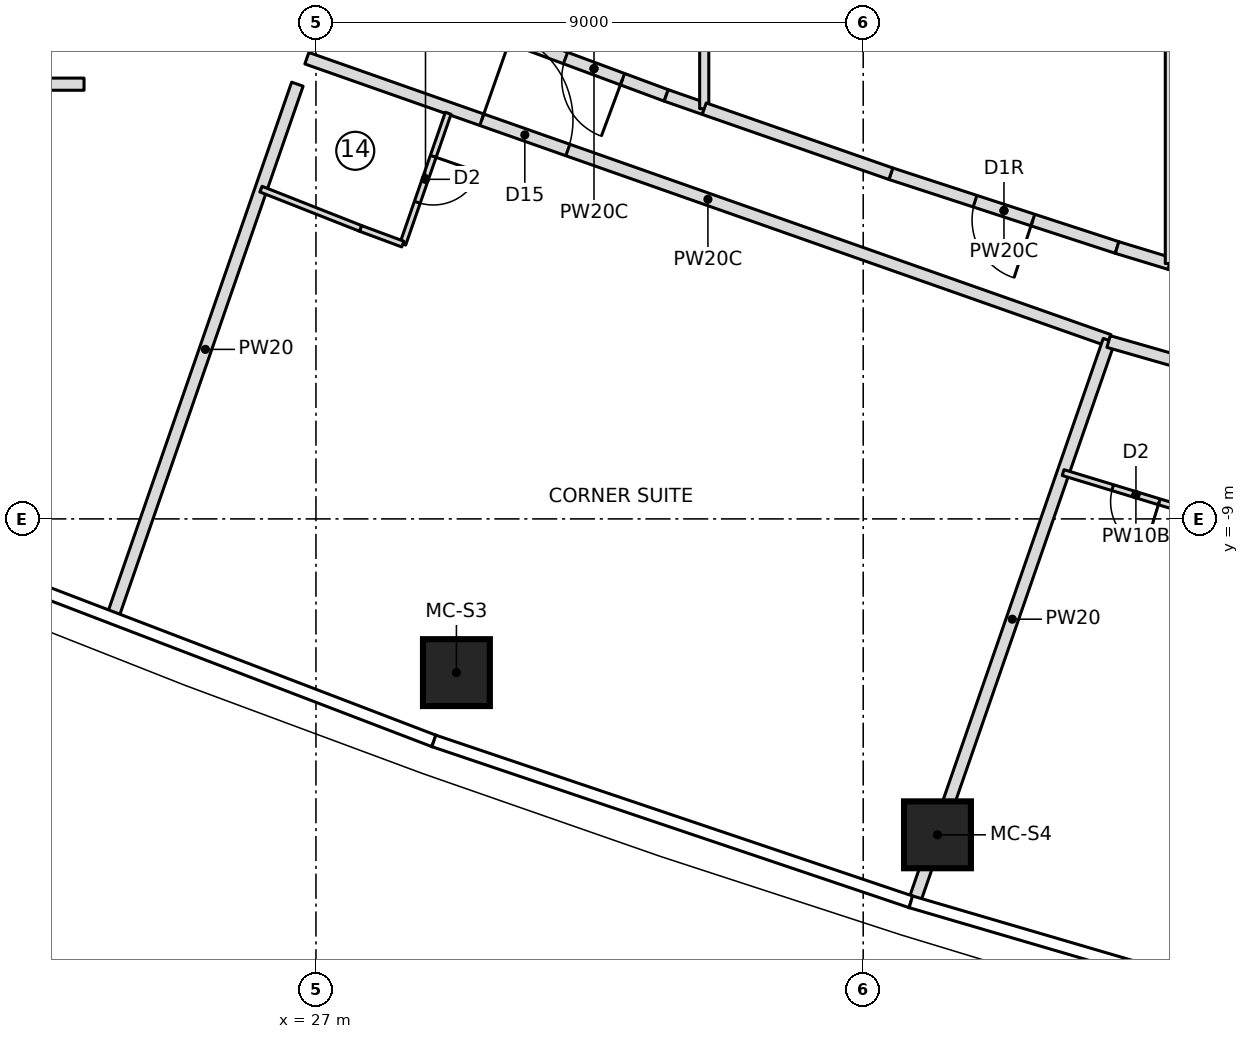
"""IFC4 building model, lengths in metres.
Left out: names, types, materials, properties, quantities, classifications, styles, units other than length and angle.
Written with IfcOpenShell. Run it as: python <this file> out.ifc"""

import sys

from ifc_helpers import new_model, si_unit, direction, frame, frame_2d, origin, origin_2d, place, context, subcontext, project, spatial, rectangle, extrude, element, fill, save


model = new_model("IFC4")
c1 = context("Model", 3, precision=1e-05, world=origin(), true_north=direction((0.0, 1.0)))
c2 = subcontext(c1, "Body", "Model", "MODEL_VIEW")
j1 = project(units=[si_unit("LENGTHUNIT", "METRE"), si_unit("PLANEANGLEUNIT", "RADIAN")], contexts=[c1])
p1 = place(None, origin())
s1 = spatial("IfcSite", under=j1, at=p1, CompositionType="ELEMENT")
p2 = place(p1, origin())
s2 = spatial("IfcBuilding", under=s1, at=p2, CompositionType="ELEMENT")
p3 = place(p2, frame((0.0, 0.0, 289.2)))
s3 = spatial("IfcBuildingStorey", under=s2, at=p3, CompositionType="ELEMENT", Elevation=289.2)
for number, where, z_axis, x_axis in (
    (1, (29.31, -11.528, 0.0), (0.0, 0.0, 1.0), (1.0, 0.0, 0.0)),
    (2, (37.221, -14.196, 0.0), (0.0, 0.0, 1.0), (1.0, 0.0, 0.0)),
):
    element("IfcColumn", number, at=place(p3, frame(where, z_axis=z_axis, x_axis=x_axis)), inside=s3, PredefinedType="COLUMN", context=c2, shape_type="SweptSolid", body=[
        extrude(rectangle(XDim=1.1, YDim=1.1, at=origin_2d()), origin(), (0.0, 0.0, 1.0), 3.55),
    ])
p4 = place(p3, frame((7.287, -1.85, 0.0), z_axis=(0.0, 0.0, 1.0), x_axis=(1.0, 0.0, 0.0)))
e3 = element("IfcWall", 3, at=p4, inside=s3, PredefinedType="PARTITIONING", context=c2, shape_type="SweptSolid", body=[
    extrude(rectangle(XDim=15.899, YDim=0.2, at=frame_2d((7.949, 0.0))), origin(), (0.0, 0.0, 1.0), 3.25),
])
p5 = place(p4, frame((7.624, 0.0, 0.0)))
e4 = element("IfcOpeningElement", 4, at=p5, cuts=e3, PredefinedType="OPENING", context=c2, shape_type="SweptSolid", body=[
    extrude(rectangle(XDim=1.0, YDim=2.1, at=frame_2d((0.5, 1.05))), frame((0.0, 0.11, 0.0), z_axis=(0.0, -1.0, 0.0), x_axis=(1.0, 0.0, 0.0)), (0.0, 0.0, 1.0), 0.22),
])
p6 = place(p3, frame((23.668, -10.573, 0.0), z_axis=(0.0, 0.0, 1.0), x_axis=(0.327714422317, 0.944776829418, 0.0)))
e5 = element("IfcWall", 5, at=p6, inside=s3, PredefinedType="PARTITIONING", context=c2, shape_type="SweptSolid", body=[
    extrude(rectangle(XDim=9.233, YDim=0.2, at=frame_2d((4.617, 0.0))), origin(), (0.0, 0.0, 1.0), 3.25),
])
p7 = place(p3, frame((26.85, -1.423, 0.0), z_axis=(0.0, 0.0, 1.0), x_axis=(0.943328585164, -0.331860182022, 0.0)))
e6 = element("IfcWall", 6, at=p7, inside=s3, PredefinedType="PARTITIONING", context=c2, shape_type="SweptSolid", body=[
    extrude(rectangle(XDim=13.984, YDim=0.2, at=frame_2d((6.992, 0.0))), origin(), (0.0, 0.0, 1.0), 3.25),
])
p8 = place(p7, frame((3.05, 0.0, 0.0)))
e7 = element("IfcOpeningElement", 7, at=p8, cuts=e6, PredefinedType="OPENING", context=c2, shape_type="SweptSolid", body=[
    extrude(rectangle(XDim=1.5, YDim=2.1, at=frame_2d((0.75, 1.05))), frame((0.0, 0.11, 0.0), z_axis=(0.0, -1.0, 0.0), x_axis=(1.0, 0.0, 0.0)), (0.0, 0.0, 1.0), 0.22),
])
p9 = place(p3, frame((29.175, -2.328, 0.0), z_axis=(0.0, 0.0, 1.0), x_axis=(-0.327718024288, -0.944775579996, 0.0)))
e8 = element("IfcWall", 8, at=p9, inside=s3, PredefinedType="PARTITIONING", context=c2, shape_type="SweptSolid", body=[
    extrude(rectangle(XDim=2.277, YDim=0.1, at=frame_2d((1.139, 0.0))), origin(), (0.0, 0.0, 1.0), 3.25),
])
p10 = place(p9, frame((0.75, 0.0, 0.0)))
e9 = element("IfcOpeningElement", 9, at=p10, cuts=e8, PredefinedType="OPENING", context=c2, shape_type="SweptSolid", body=[
    extrude(rectangle(XDim=0.8, YDim=2.1, at=frame_2d((0.4, 1.05))), frame((0.0, 0.06, 0.0), z_axis=(0.0, -1.0, 0.0), x_axis=(1.0, 0.0, 0.0)), (0.0, 0.0, 1.0), 0.12),
])
p11 = place(p3, frame((28.428, -4.48, 0.0), z_axis=(0.0, 0.0, 1.0), x_axis=(-0.937514267289, 0.347946833049, 0.0)))
e10 = element("IfcWall", 10, at=p11, inside=s3, PredefinedType="PARTITIONING", context=c2, shape_type="SweptSolid", body=[
    extrude(rectangle(XDim=0.742, YDim=0.1, at=frame_2d((0.371, 0.0))), origin(), (0.0, 0.0, 1.0), 3.25),
])
p12 = place(p3, frame((27.733, -4.222, 0.0), z_axis=(0.0, 0.0, 1.0), x_axis=(-0.930254925629, 0.366913850028, 0.0)))
e11 = element("IfcWall", 11, at=p12, inside=s3, PredefinedType="PARTITIONING", context=c2, shape_type="SweptSolid", body=[
    extrude(rectangle(XDim=1.76, YDim=0.1, at=frame_2d((0.88, 0.0))), origin(), (0.0, 0.0, 1.0), 3.25),
])
p13 = place(p3, frame((36.861, -15.235, 0.0), z_axis=(0.0, 0.0, 1.0), x_axis=(0.327710853631, 0.944778067279, 0.0)))
e12 = element("IfcWall", 12, at=p13, inside=s3, PredefinedType="PARTITIONING", context=c2, shape_type="SweptSolid", body=[
    extrude(rectangle(XDim=9.707, YDim=0.2, at=frame_2d((4.854, 0.0))), origin(), (0.0, 0.0, 1.0), 3.25),
])
p14 = place(p3, frame((40.035, -6.083, 0.0), z_axis=(0.0, 0.0, 1.0), x_axis=(0.961195333593, -0.275868683759, 0.0)))
e13 = element("IfcWall", 13, at=p14, inside=s3, PredefinedType="PARTITIONING", context=c2, shape_type="SweptSolid", body=[
    extrude(rectangle(XDim=8.597, YDim=0.2, at=frame_2d((4.298, 0.0))), origin(), (0.0, 0.0, 1.0), 3.25),
])
p15 = place(p14, frame((3.05, 0.0, 0.0)))
e14 = element("IfcOpeningElement", 14, at=p15, cuts=e13, PredefinedType="OPENING", context=c2, shape_type="SweptSolid", body=[
    extrude(rectangle(XDim=1.5, YDim=2.1, at=frame_2d((0.75, 1.05))), frame((0.0, 0.11, 0.0), z_axis=(0.0, -1.0, 0.0), x_axis=(1.0, 0.0, 0.0)), (0.0, 0.0, 1.0), 0.22),
])
p16 = place(p3, frame((41.681, -8.966, 0.0), z_axis=(0.0, 0.0, 1.0), x_axis=(-0.956723503196, 0.290998519638, 0.0)))
e15 = element("IfcWall", 15, at=p16, inside=s3, PredefinedType="PARTITIONING", context=c2, shape_type="SweptSolid", body=[
    extrude(rectangle(XDim=2.502, YDim=0.1, at=frame_2d((1.251, 0.0))), origin(), (0.0, 0.0, 1.0), 3.25),
])
p17 = place(p16, frame((0.85, 0.0, 0.0)))
e16 = element("IfcOpeningElement", 16, at=p17, cuts=e15, PredefinedType="OPENING", context=c2, shape_type="SweptSolid", body=[
    extrude(rectangle(XDim=0.8, YDim=2.1, at=frame_2d((0.4, 1.05))), frame((0.0, 0.06, 0.0), z_axis=(0.0, -1.0, 0.0), x_axis=(1.0, 0.0, 0.0)), (0.0, 0.0, 1.0), 0.12),
])
p18 = place(p3, frame((32.76, -2.035, 0.0), z_axis=(0.0, 0.0, 1.0), x_axis=(-0.937461225735, 0.348089715797, 0.0)))
e17 = element("IfcWall", 17, at=p18, inside=s3, PredefinedType="PARTITIONING", context=c2, shape_type="SweptSolid", body=[
    extrude(rectangle(XDim=2.533, YDim=0.2, at=frame_2d((1.266, 0.0))), origin(), (0.0, 0.0, 1.0), 3.25),
])
p19 = place(p18, frame((0.766, 0.0, 0.0)))
e18 = element("IfcOpeningElement", 18, at=p19, cuts=e17, PredefinedType="OPENING", context=c2, shape_type="SweptSolid", body=[
    extrude(rectangle(XDim=1.0, YDim=2.1, at=frame_2d((0.5, 1.05))), frame((0.0, 0.11, 0.0), z_axis=(0.0, -1.0, 0.0), x_axis=(1.0, 0.0, 0.0)), (0.0, 0.0, 1.0), 0.22),
])
p20 = place(p3, frame((33.385, -2.253, 0.0), z_axis=(0.0, 0.0, 1.0), x_axis=(-0.944322693955, 0.329020743543, 0.0)))
e19 = element("IfcWall", 19, at=p20, inside=s3, PredefinedType="PARTITIONING", context=c2, shape_type="SweptSolid", body=[
    extrude(rectangle(XDim=0.663, YDim=0.2, at=frame_2d((0.331, 0.0))), origin(), (0.0, 0.0, 1.0), 3.25),
])
p21 = place(p3, frame((33.385, -2.253, 0.0), z_axis=(0.0, 0.0, 1.0), x_axis=(0.0, 1.0, 0.0)))
e20 = element("IfcWall", 20, at=p21, inside=s3, PredefinedType="PARTITIONING", context=c2, shape_type="SweptSolid", body=[
    extrude(rectangle(XDim=4.506, YDim=0.15, at=frame_2d((2.253, 0.0))), origin(), (0.0, 0.0, 1.0), 3.25),
])
p22 = place(p3, frame((40.175, -4.536, 0.0), z_axis=(0.0, 0.0, 1.0), x_axis=(-0.950709849021, 0.310081897206, 0.0)))
e21 = element("IfcWall", 21, at=p22, inside=s3, PredefinedType="PARTITIONING", context=c2, shape_type="SweptSolid", body=[
    extrude(rectangle(XDim=3.913, YDim=0.2, at=frame_2d((1.957, 0.0))), origin(), (0.0, 0.0, 1.0), 3.25),
])
p23 = place(p22, frame((1.457, 0.0, 0.0)))
e22 = element("IfcOpeningElement", 22, at=p23, cuts=e21, PredefinedType="OPENING", context=c2, shape_type="SweptSolid", body=[
    extrude(rectangle(XDim=1.0, YDim=2.1, at=frame_2d((0.5, 1.05))), frame((0.0, 0.11, 0.0), z_axis=(0.0, -1.0, 0.0), x_axis=(1.0, 0.0, 0.0)), (0.0, 0.0, 1.0), 0.22),
])
p24 = place(p3, frame((41.043, -4.8, 0.0), z_axis=(0.0, 0.0, 1.0), x_axis=(-0.956745556466, 0.290926004652, 0.0)))
e23 = element("IfcWall", 23, at=p24, inside=s3, PredefinedType="PARTITIONING", context=c2, shape_type="SweptSolid", body=[
    extrude(rectangle(XDim=0.907, YDim=0.2, at=frame_2d((0.454, 0.0))), origin(), (0.0, 0.0, 1.0), 3.25),
])
p25 = place(p3, frame((36.455, -3.323, 0.0), z_axis=(0.0, 0.0, 1.0), x_axis=(-0.944275670423, 0.329155674791, 0.0)))
e24 = element("IfcWall", 24, at=p25, inside=s3, PredefinedType="PARTITIONING", context=c2, shape_type="SweptSolid", body=[
    extrude(rectangle(XDim=3.25, YDim=0.2, at=frame_2d((1.625, 0.0))), origin(), (0.0, 0.0, 1.0), 3.25),
])
p26 = place(p3, frame((41.043, -4.8, 0.0), z_axis=(0.0, 0.0, 1.0), x_axis=(0.0, 1.0, 0.0)))
e25 = element("IfcWall", 25, at=p26, inside=s3, PredefinedType="PARTITIONING", context=c2, shape_type="SweptSolid", body=[
    extrude(rectangle(XDim=9.6, YDim=0.15, at=frame_2d((4.8, 0.0))), origin(), (0.0, 0.0, 1.0), 3.25),
])
p27 = place(p3, frame((43.918, -5.675, 0.0), z_axis=(0.0, 0.0, 1.0), x_axis=(-0.956717150932, 0.291019403327, 0.0)))
e26 = element("IfcWall", 26, at=p27, inside=s3, PredefinedType="PARTITIONING", context=c2, shape_type="SweptSolid", body=[
    extrude(rectangle(XDim=3.006, YDim=0.2, at=frame_2d((1.503, 0.0))), origin(), (0.0, 0.0, 1.0), 3.25),
])
p28 = place(p10, origin())
e27 = element("IfcDoor", 27, at=p28, inside=s3, OperationType="SINGLE_SWING_LEFT", PredefinedType="DOOR", context=c2, shape_type="SweptSolid", body=[
    extrude(rectangle(XDim=0.8, YDim=2.1, at=frame_2d((0.4, 1.05))), frame((0.0, 0.025, 0.0), z_axis=(0.0, -1.0, 0.0), x_axis=(1.0, 0.0, 0.0)), (0.0, 0.0, 1.0), 0.05),
])
fill(e9, e27)
p29 = place(p8, origin())
e28 = element("IfcDoor", 28, at=p29, inside=s3, OperationType="DOUBLE_DOOR_SINGLE_SWING", PredefinedType="DOOR", context=c2, shape_type="SweptSolid", body=[
    extrude(rectangle(XDim=1.5, YDim=2.1, at=frame_2d((0.75, 1.05))), frame((0.0, 0.025, 0.0), z_axis=(0.0, -1.0, 0.0), x_axis=(1.0, 0.0, 0.0)), (0.0, 0.0, 1.0), 0.05),
])
fill(e7, e28)
p30 = place(p17, origin())
e29 = element("IfcDoor", 29, at=p30, inside=s3, OperationType="SINGLE_SWING_LEFT", PredefinedType="DOOR", context=c2, shape_type="SweptSolid", body=[
    extrude(rectangle(XDim=0.8, YDim=2.1, at=frame_2d((0.4, 1.05))), frame((0.0, 0.025, 0.0), z_axis=(0.0, -1.0, 0.0), x_axis=(1.0, 0.0, 0.0)), (0.0, 0.0, 1.0), 0.05),
])
fill(e16, e29)
p31 = place(p19, origin())
e30 = element("IfcDoor", 30, at=p31, inside=s3, OperationType="SINGLE_SWING_LEFT", PredefinedType="DOOR", context=c2, shape_type="SweptSolid", body=[
    extrude(rectangle(XDim=1.0, YDim=2.1, at=frame_2d((0.5, 1.05))), frame((0.0, 0.025, 0.0), z_axis=(0.0, -1.0, 0.0), x_axis=(1.0, 0.0, 0.0)), (0.0, 0.0, 1.0), 0.05),
])
fill(e18, e30)
p32 = place(p23, origin())
e31 = element("IfcDoor", 31, at=p32, inside=s3, OperationType="SINGLE_SWING_RIGHT", PredefinedType="DOOR", context=c2, shape_type="SweptSolid", body=[
    extrude(rectangle(XDim=1.0, YDim=2.1, at=frame_2d((0.5, 1.05))), frame((0.0, 0.025, 0.0), z_axis=(0.0, -1.0, 0.0), x_axis=(1.0, 0.0, 0.0)), (0.0, 0.0, 1.0), 0.05),
])
fill(e22, e31)
save(model, sys.argv[1])
